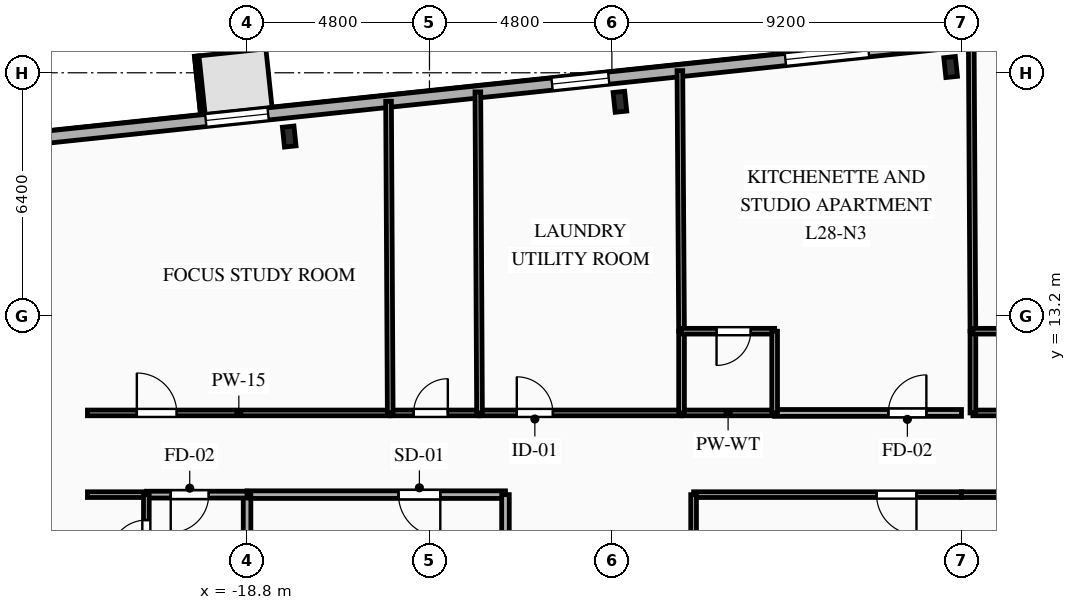
"""IFC4 building model, lengths in metres.
Left out: names, types, materials, properties, quantities, classifications, styles, units other than length and angle.
Written with IfcOpenShell. Run it as: python <this file> out.ifc"""

import sys

from ifc_helpers import new_model, si_unit, direction, frame, frame_2d, origin, origin_2d, place, context, subcontext, project, spatial, rectangle, i_section, extrude, element, fill, save


model = new_model("IFC4")
c1 = context("Model", 3, precision=1e-05, world=origin(), true_north=direction((0.0, 1.0)))
c2 = subcontext(c1, "Body", "Model", "MODEL_VIEW")
j1 = project(units=[si_unit("LENGTHUNIT", "METRE"), si_unit("PLANEANGLEUNIT", "RADIAN")], contexts=[c1])
p1 = place(None, origin())
s1 = spatial("IfcSite", under=j1, at=p1, CompositionType="ELEMENT")
p2 = place(p1, origin())
s2 = spatial("IfcBuilding", under=s1, at=p2, CompositionType="ELEMENT")
p3 = place(p2, frame((0.0, 0.0, 102.45)))
s3 = spatial("IfcBuildingStorey", under=s2, at=p3, CompositionType="ELEMENT", Elevation=102.45)
for number, where, z_axis, x_axis in (
    (1, (-0.287, 19.751, 0.0), (0.0, 0.0, 1.0), (0.995, 0.105, 0.0)),
    (2, (-8.989, 18.836, 0.0), (0.0, 0.0, 1.0), (0.995, 0.105, 0.0)),
    (3, (-17.691, 17.922, 0.0), (0.0, 0.0, 1.0), (0.995, 0.105, 0.0)),
):
    element("IfcColumn", number, at=place(p3, frame(where, z_axis=z_axis, x_axis=x_axis)), inside=s3, PredefinedType="COLUMN", context=c2, shape_type="SweptSolid", body=[
        extrude(i_section(OverallWidth=0.306, OverallDepth=0.524, WebThickness=0.021, FlangeThickness=0.04, FilletRadius=0.027, at=origin_2d()), origin(), (0.0, 0.0, 1.0), 3.35),
    ])
p4 = place(p3, frame((-27.107, 17.586, 0.0), z_axis=(0.0, 0.0, 1.0), x_axis=(0.994521628355, 0.104531003701, 0.0)))
e4 = element("IfcWall", 4, at=p4, inside=s3, PredefinedType="SOLIDWALL", context=c2, shape_type="SweptSolid", body=[
    extrude(rectangle(XDim=53.8, YDim=0.32, at=frame_2d((26.9, 0.0))), origin(), (0.0, 0.0, 1.0), 3.045),
])
p5 = place(p4, frame((7.261, 0.0, 0.85)))
e5 = element("IfcOpeningElement", 5, at=p5, cuts=e4, PredefinedType="OPENING", context=c2, shape_type="SweptSolid", body=[
    extrude(rectangle(XDim=1.65, YDim=1.85, at=frame_2d((0.825, 0.925))), frame((0.0, 0.17, 0.0), z_axis=(0.0, -1.0, 0.0), x_axis=(1.0, 0.0, 0.0)), (0.0, 0.0, 1.0), 0.34),
])
p6 = place(p4, frame((16.423, 0.0, 0.85)))
e6 = element("IfcOpeningElement", 6, at=p6, cuts=e4, PredefinedType="OPENING", context=c2, shape_type="SweptSolid", body=[
    extrude(rectangle(XDim=1.5, YDim=1.85, at=frame_2d((0.75, 0.925))), frame((0.0, 0.17, 0.0), z_axis=(0.0, -1.0, 0.0), x_axis=(1.0, 0.0, 0.0)), (0.0, 0.0, 1.0), 0.34),
])
p7 = place(p4, frame((22.598, 0.0, 0.85)))
e7 = element("IfcOpeningElement", 7, at=p7, cuts=e4, PredefinedType="OPENING", context=c2, shape_type="SweptSolid", body=[
    extrude(rectangle(XDim=2.2, YDim=1.85, at=frame_2d((1.1, 0.925))), frame((0.0, 0.17, 0.0), z_axis=(0.0, -1.0, 0.0), x_axis=(1.0, 0.0, 0.0)), (0.0, 0.0, 1.0), 0.34),
])
p8 = place(p4, frame((30.283, 0.0, 0.85)))
e8 = element("IfcOpeningElement", 8, at=p8, cuts=e4, PredefinedType="OPENING", context=c2, shape_type="SweptSolid", body=[
    extrude(rectangle(XDim=2.2, YDim=1.85, at=frame_2d((1.1, 0.925))), frame((0.0, 0.17, 0.0), z_axis=(0.0, -1.0, 0.0), x_axis=(1.0, 0.0, 0.0)), (0.0, 0.0, 1.0), 0.34),
])
p9 = place(p4, frame((38.009, 0.0, 0.85)))
e9 = element("IfcOpeningElement", 9, at=p9, cuts=e4, PredefinedType="OPENING", context=c2, shape_type="SweptSolid", body=[
    extrude(rectangle(XDim=2.2, YDim=1.85, at=frame_2d((1.1, 0.925))), frame((0.0, 0.17, 0.0), z_axis=(0.0, -1.0, 0.0), x_axis=(1.0, 0.0, 0.0)), (0.0, 0.0, 1.0), 0.34),
])
p10 = place(p4, frame((44.008, 0.0, 0.85)))
e10 = element("IfcOpeningElement", 10, at=p10, cuts=e4, PredefinedType="OPENING", context=c2, shape_type="SweptSolid", body=[
    extrude(rectangle(XDim=1.65, YDim=1.85, at=frame_2d((0.825, 0.925))), frame((0.0, 0.17, 0.0), z_axis=(0.0, -1.0, 0.0), x_axis=(1.0, 0.0, 0.0)), (0.0, 0.0, 1.0), 0.34),
])
p11 = place(p4, frame((47.691, 0.0, 0.85)))
e11 = element("IfcOpeningElement", 11, at=p11, cuts=e4, PredefinedType="OPENING", context=c2, shape_type="SweptSolid", body=[
    extrude(rectangle(XDim=1.65, YDim=1.85, at=frame_2d((0.825, 0.925))), frame((0.0, 0.17, 0.0), z_axis=(0.0, -1.0, 0.0), x_axis=(1.0, 0.0, 0.0)), (0.0, 0.0, 1.0), 0.34),
])
p12 = place(p4, frame((51.054, 0.0, 0.85)))
e12 = element("IfcOpeningElement", 12, at=p12, cuts=e4, PredefinedType="OPENING", context=c2, shape_type="SweptSolid", body=[
    extrude(rectangle(XDim=1.65, YDim=1.85, at=frame_2d((0.825, 0.925))), frame((0.0, 0.17, 0.0), z_axis=(0.0, -1.0, 0.0), x_axis=(1.0, 0.0, 0.0)), (0.0, 0.0, 1.0), 0.34),
])
p13 = place(p3, frame((-12.0, 8.5, 0.0), z_axis=(0.0, 0.0, 1.0), x_axis=(-1.0, 0.0, 0.0)))
e13 = element("IfcWall", 13, at=p13, inside=s3, PredefinedType="PARTITIONING", context=c2, shape_type="SweptSolid", body=[
    extrude(rectangle(XDim=6.8, YDim=0.2, at=frame_2d((3.4, 0.0))), origin(), (0.0, 0.0, 1.0), 3.045),
])
p14 = place(p13, frame((1.715, 0.0, 0.0)))
e14 = element("IfcOpeningElement", 14, at=p14, cuts=e13, PredefinedType="OPENING", context=c2, shape_type="SweptSolid", body=[
    extrude(rectangle(XDim=1.1, YDim=2.15, at=frame_2d((0.55, 1.075))), frame((0.0, 0.11, 0.0), z_axis=(0.0, -1.0, 0.0), x_axis=(1.0, 0.0, 0.0)), (0.0, 0.0, 1.0), 0.22),
])
p15 = place(p3, frame((-12.0, 5.6, 0.0), z_axis=(0.0, 0.0, 1.0), x_axis=(0.0, 1.0, 0.0)))
e15 = element("IfcWall", 15, at=p15, inside=s3, PredefinedType="PARTITIONING", context=c2, shape_type="SweptSolid", body=[
    extrude(rectangle(XDim=2.9, YDim=0.2, at=frame_2d((1.45, 0.0))), origin(), (0.0, 0.0, 1.0), 3.045),
])
p16 = place(p3, frame((-18.8, 8.5, 0.0), z_axis=(0.0, 0.0, 1.0), x_axis=(0.0, -1.0, 0.0)))
e16 = element("IfcWall", 16, at=p16, inside=s3, PredefinedType="PARTITIONING", context=c2, shape_type="SweptSolid", body=[
    extrude(rectangle(XDim=2.9, YDim=0.2, at=frame_2d((1.45, 0.0))), origin(), (0.0, 0.0, 1.0), 2.53),
])
p17 = place(p3, frame((-18.8, 8.5, 0.0), z_axis=(0.0, 0.0, 1.0), x_axis=(-1.0, 0.0, 0.0)))
e17 = element("IfcWall", 17, at=p17, inside=s3, PredefinedType="PARTITIONING", context=c2, shape_type="SweptSolid", body=[
    extrude(rectangle(XDim=2.65, YDim=0.18, at=frame_2d((1.325, 0.0))), origin(), (0.0, 0.0, 1.0), 3.045),
])
p18 = place(p17, frame((1.009, 0.0, 0.0)))
e18 = element("IfcOpeningElement", 18, at=p18, cuts=e17, PredefinedType="OPENING", context=c2, shape_type="SweptSolid", body=[
    extrude(rectangle(XDim=1.0, YDim=2.15, at=frame_2d((0.5, 1.075))), frame((0.0, 0.1, 0.0), z_axis=(0.0, -1.0, 0.0), x_axis=(1.0, 0.0, 0.0)), (0.0, 0.0, 1.0), 0.2),
])
p19 = place(p3, frame((-21.45, 8.5, 0.0), z_axis=(0.0, 0.0, 1.0), x_axis=(-1.0, 0.0, 0.0)))
e19 = element("IfcWall", 19, at=p19, inside=s3, PredefinedType="PARTITIONING", context=c2, shape_type="SweptSolid", body=[
    extrude(rectangle(XDim=1.55, YDim=0.15, at=frame_2d((0.775, 0.0))), origin(), (0.0, 0.0, 1.0), 3.045),
])
p20 = place(p3, frame((-23.0, 10.65, 0.0), z_axis=(0.0, 0.0, 1.0), x_axis=(1.0, 0.0, 0.0)))
e20 = element("IfcWall", 20, at=p20, inside=s3, PredefinedType="PARTITIONING", context=c2, shape_type="SweptSolid", body=[
    extrude(rectangle(XDim=7.967, YDim=0.15, at=frame_2d((3.983, 0.0))), origin(), (0.0, 0.0, 1.0), 3.045),
])
p21 = place(p20, frame((1.3, 0.0, 0.0)))
e21 = element("IfcOpeningElement", 21, at=p21, cuts=e20, PredefinedType="OPENING", context=c2, shape_type="SweptSolid", body=[
    extrude(rectangle(XDim=1.05, YDim=2.15, at=frame_2d((0.525, 1.075))), frame((0.0, 0.085, 0.0), z_axis=(0.0, -1.0, 0.0), x_axis=(1.0, 0.0, 0.0)), (0.0, 0.0, 1.0), 0.17),
])
p22 = place(p3, frame((-15.033, 10.65, 0.0), z_axis=(0.0, 0.0, 1.0), x_axis=(1.0, 0.0, 0.0)))
e22 = element("IfcWall", 22, at=p22, inside=s3, PredefinedType="PLUMBINGWALL", context=c2, shape_type="SweptSolid", body=[
    extrude(rectangle(XDim=2.35, YDim=0.15, at=frame_2d((1.175, 0.0))), origin(), (0.0, 0.0, 1.0), 3.045),
])
p23 = place(p22, frame((0.616, 0.0, 0.0)))
e23 = element("IfcOpeningElement", 23, at=p23, cuts=e22, PredefinedType="OPENING", context=c2, shape_type="SweptSolid", body=[
    extrude(rectangle(XDim=0.9, YDim=2.1, at=frame_2d((0.45, 1.05))), frame((0.0, 0.085, 0.0), z_axis=(0.0, -1.0, 0.0), x_axis=(1.0, 0.0, 0.0)), (0.0, 0.0, 1.0), 0.17),
])
p24 = place(p3, frame((-12.683, 10.65, 0.0), z_axis=(0.0, 0.0, 1.0), x_axis=(1.0, 0.0, 0.0)))
e24 = element("IfcWall", 24, at=p24, inside=s3, PredefinedType="PARTITIONING", context=c2, shape_type="SweptSolid", body=[
    extrude(rectangle(XDim=5.316, YDim=0.15, at=frame_2d((2.658, 0.0))), origin(), (0.0, 0.0, 1.0), 3.045),
])
p25 = place(p24, frame((0.981, 0.0, 0.0)))
e25 = element("IfcOpeningElement", 25, at=p25, cuts=e24, PredefinedType="OPENING", context=c2, shape_type="SweptSolid", body=[
    extrude(rectangle(XDim=0.95, YDim=2.1, at=frame_2d((0.475, 1.05))), frame((0.0, 0.085, 0.0), z_axis=(0.0, -1.0, 0.0), x_axis=(1.0, 0.0, 0.0)), (0.0, 0.0, 1.0), 0.17),
])
p26 = place(p3, frame((-4.917, 10.65, 0.0), z_axis=(0.0, 0.0, 1.0), x_axis=(1.0, 0.0, 0.0)))
e26 = element("IfcWall", 26, at=p26, inside=s3, PredefinedType="PARTITIONING", context=c2, shape_type="SweptSolid", body=[
    extrude(rectangle(XDim=4.917, YDim=0.18, at=frame_2d((2.458, 0.0))), origin(), (0.0, 0.0, 1.0), 3.045),
])
p27 = place(p26, frame((2.992, 0.0, 0.0)))
e27 = element("IfcOpeningElement", 27, at=p27, cuts=e26, PredefinedType="OPENING", context=c2, shape_type="SweptSolid", body=[
    extrude(rectangle(XDim=1.0, YDim=2.15, at=frame_2d((0.5, 1.075))), frame((0.0, 0.1, 0.0), z_axis=(0.0, -1.0, 0.0), x_axis=(1.0, 0.0, 0.0)), (0.0, 0.0, 1.0), 0.2),
])
p28 = place(p3, frame((-7.367, 10.65, 0.0), z_axis=(0.0, 0.0, 1.0), x_axis=(1.0, 0.0, 0.0)))
e28 = element("IfcWall", 28, at=p28, inside=s3, PredefinedType="PLUMBINGWALL", context=c2, shape_type="SweptSolid", body=[
    extrude(rectangle(XDim=2.45, YDim=0.15, at=frame_2d((1.225, 0.0))), origin(), (0.0, 0.0, 1.0), 3.045),
])
p29 = place(p3, frame((0.0, 8.5, 0.0), z_axis=(0.0, 0.0, 1.0), x_axis=(-1.0, 0.0, 0.0)))
e29 = element("IfcWall", 29, at=p29, inside=s3, PredefinedType="PARTITIONING", context=c2, shape_type="SweptSolid", body=[
    extrude(rectangle(XDim=7.05, YDim=0.15, at=frame_2d((3.525, 0.0))), origin(), (0.0, 0.0, 1.0), 3.045),
])
p30 = place(p29, frame((1.185, 0.0, 0.0)))
e30 = element("IfcOpeningElement", 30, at=p30, cuts=e29, PredefinedType="OPENING", context=c2, shape_type="SweptSolid", body=[
    extrude(rectangle(XDim=1.05, YDim=2.15, at=frame_2d((0.525, 1.075))), frame((0.0, 0.085, 0.0), z_axis=(0.0, -1.0, 0.0), x_axis=(1.0, 0.0, 0.0)), (0.0, 0.0, 1.0), 0.17),
])
p31 = place(p3, frame((0.3, 10.65, 0.0), z_axis=(0.0, 0.0, 1.0), x_axis=(1.0, 0.0, 0.0)))
e31 = element("IfcWall", 31, at=p31, inside=s3, PredefinedType="PLUMBINGWALL", context=c2, shape_type="SweptSolid", body=[
    extrude(rectangle(XDim=2.45, YDim=0.15, at=frame_2d((1.225, 0.0))), origin(), (0.0, 0.0, 1.0), 3.045),
])
for number, where, z_axis, x_axis in (
    (32, (7.05, 8.5, 0.0), (0.0, 0.0, 1.0), (-1.0, 0.0, 0.0)),
    (33, (-7.05, 8.5, 0.0), (0.0, 0.0, 1.0), (0.0, -1.0, 0.0)),
):
    element("IfcWall", number, at=place(p3, frame(where, z_axis=z_axis, x_axis=x_axis)), inside=s3, PredefinedType="PARTITIONING", context=c2, shape_type="SweptSolid", body=[
        extrude(rectangle(XDim=7.05, YDim=0.15, at=frame_2d((3.525, 0.0))), origin(), (0.0, 0.0, 1.0), 3.045),
    ])
p32 = place(p3, frame((-21.45, 5.68, 0.0), z_axis=(0.0, 0.0, 1.0), x_axis=(0.0, 1.0, 0.0)))
e34 = element("IfcWall", 34, at=p32, inside=s3, PredefinedType="PARTITIONING", context=c2, shape_type="SweptSolid", body=[
    extrude(rectangle(XDim=2.82, YDim=0.15, at=frame_2d((1.41, 0.0))), origin(), (0.0, 0.0, 1.0), 3.045),
])
p33 = place(p32, frame((1.201, 0.0, 0.0)))
e35 = element("IfcOpeningElement", 35, at=p33, cuts=e34, PredefinedType="OPENING", context=c2, shape_type="SweptSolid", body=[
    extrude(rectangle(XDim=0.95, YDim=2.1, at=frame_2d((0.475, 1.05))), frame((0.0, 0.085, 0.0), z_axis=(0.0, -1.0, 0.0), x_axis=(1.0, 0.0, 0.0)), (0.0, 0.0, 1.0), 0.17),
])
p34 = place(p3, frame((-15.077, 18.85, 0.0), z_axis=(0.0, 0.0, 1.0), x_axis=(0.005358979853, -0.999985640564, 0.0)))
e36 = element("IfcWall", 36, at=p34, inside=s3, PredefinedType="PLUMBINGWALL", context=c2, shape_type="SweptSolid", body=[
    extrude(rectangle(XDim=8.2, YDim=0.15, at=frame_2d((4.1, 0.0))), origin(), (0.0, 0.0, 1.0), 3.045),
])
p35 = place(p3, frame((-12.727, 19.097, 0.0), z_axis=(0.0, 0.0, 1.0), x_axis=(0.005173341175, -0.999986618181, 0.0)))
e37 = element("IfcWall", 37, at=p35, inside=s3, PredefinedType="PLUMBINGWALL", context=c2, shape_type="SweptSolid", body=[
    extrude(rectangle(XDim=8.447, YDim=0.15, at=frame_2d((4.224, 0.0))), origin(), (0.0, 0.0, 1.0), 3.045),
])
p36 = place(p3, frame((-7.411, 19.656, 0.0), z_axis=(0.0, 0.0, 1.0), x_axis=(0.006409668201, -0.999979457866, 0.0)))
e38 = element("IfcWall", 38, at=p36, inside=s3, PredefinedType="PARTITIONING", context=c2, shape_type="SweptSolid", body=[
    extrude(rectangle(XDim=6.856, YDim=0.15, at=frame_2d((3.428, 0.0))), origin(), (0.0, 0.0, 1.0), 3.045),
])
p37 = place(p3, frame((-7.367, 12.8, 0.0), z_axis=(0.0, 0.0, 1.0), x_axis=(0.0, -1.0, 0.0)))
e39 = element("IfcWall", 39, at=p37, inside=s3, PredefinedType="PLUMBINGWALL", context=c2, shape_type="SweptSolid", body=[
    extrude(rectangle(XDim=2.15, YDim=0.15, at=frame_2d((1.075, 0.0))), origin(), (0.0, 0.0, 1.0), 3.045),
])
p38 = place(p3, frame((-4.917, 12.8, 0.0), z_axis=(0.0, 0.0, 1.0), x_axis=(-1.0, 0.0, 0.0)))
e40 = element("IfcWall", 40, at=p38, inside=s3, PredefinedType="PLUMBINGWALL", context=c2, shape_type="SweptSolid", body=[
    extrude(rectangle(XDim=2.45, YDim=0.15, at=frame_2d((1.225, 0.0))), origin(), (0.0, 0.0, 1.0), 3.045),
])
p39 = place(p38, frame((0.629, 0.0, 0.0)))
e41 = element("IfcOpeningElement", 41, at=p39, cuts=e40, PredefinedType="OPENING", context=c2, shape_type="SweptSolid", body=[
    extrude(rectangle(XDim=0.9, YDim=2.1, at=frame_2d((0.45, 1.05))), frame((0.0, 0.085, 0.0), z_axis=(0.0, -1.0, 0.0), x_axis=(1.0, 0.0, 0.0)), (0.0, 0.0, 1.0), 0.17),
])
p40 = place(p3, frame((-4.917, 10.65, 0.0), z_axis=(0.0, 0.0, 1.0), x_axis=(0.0, 1.0, 0.0)))
e42 = element("IfcWall", 42, at=p40, inside=s3, PredefinedType="PLUMBINGWALL", context=c2, shape_type="SweptSolid", body=[
    extrude(rectangle(XDim=2.15, YDim=0.15, at=frame_2d((1.075, 0.0))), origin(), (0.0, 0.0, 1.0), 3.045),
])
p41 = place(p3, frame((0.256, 20.462, 0.0), z_axis=(0.0, 0.0, 1.0), x_axis=(0.00573567775, -0.999983550865, 0.0)))
e43 = element("IfcWall", 43, at=p41, inside=s3, PredefinedType="PARTITIONING", context=c2, shape_type="SweptSolid", body=[
    extrude(rectangle(XDim=7.662, YDim=0.15, at=frame_2d((3.831, 0.0))), origin(), (0.0, 0.0, 1.0), 3.045),
])
p42 = place(p3, frame((0.3, 12.8, 0.0), z_axis=(0.0, 0.0, 1.0), x_axis=(0.0, -1.0, 0.0)))
e44 = element("IfcWall", 44, at=p42, inside=s3, PredefinedType="PLUMBINGWALL", context=c2, shape_type="SweptSolid", body=[
    extrude(rectangle(XDim=2.15, YDim=0.15, at=frame_2d((1.075, 0.0))), origin(), (0.0, 0.0, 1.0), 3.045),
])
p43 = place(p3, frame((2.75, 12.8, 0.0), z_axis=(0.0, 0.0, 1.0), x_axis=(-1.0, 0.0, 0.0)))
e45 = element("IfcWall", 45, at=p43, inside=s3, PredefinedType="PLUMBINGWALL", context=c2, shape_type="SweptSolid", body=[
    extrude(rectangle(XDim=2.45, YDim=0.15, at=frame_2d((1.225, 0.0))), origin(), (0.0, 0.0, 1.0), 3.045),
])
p44 = place(p43, frame((0.629, 0.0, 0.0)))
e46 = element("IfcOpeningElement", 46, at=p44, cuts=e45, PredefinedType="OPENING", context=c2, shape_type="SweptSolid", body=[
    extrude(rectangle(XDim=0.9, YDim=2.1, at=frame_2d((0.45, 1.05))), frame((0.0, 0.085, 0.0), z_axis=(0.0, -1.0, 0.0), x_axis=(1.0, 0.0, 0.0)), (0.0, 0.0, 1.0), 0.17),
])
p45 = place(p5, origin())
e47 = element("IfcWindow", 47, at=p45, inside=s3, PartitioningType="SINGLE_PANEL", PredefinedType="WINDOW", context=c2, shape_type="SweptSolid", body=[
    extrude(rectangle(XDim=1.65, YDim=1.85, at=frame_2d((0.825, 0.925))), frame((0.0, 0.03, 0.0), z_axis=(0.0, -1.0, 0.0), x_axis=(1.0, 0.0, 0.0)), (0.0, 0.0, 1.0), 0.06),
])
fill(e5, e47)
p46 = place(p6, origin())
e48 = element("IfcWindow", 48, at=p46, inside=s3, PartitioningType="SINGLE_PANEL", PredefinedType="WINDOW", context=c2, shape_type="SweptSolid", body=[
    extrude(rectangle(XDim=1.5, YDim=1.85, at=frame_2d((0.75, 0.925))), frame((0.0, 0.03, 0.0), z_axis=(0.0, -1.0, 0.0), x_axis=(1.0, 0.0, 0.0)), (0.0, 0.0, 1.0), 0.06),
])
fill(e6, e48)
p47 = place(p7, origin())
e49 = element("IfcWindow", 49, at=p47, inside=s3, PartitioningType="SINGLE_PANEL", PredefinedType="WINDOW", context=c2, shape_type="SweptSolid", body=[
    extrude(rectangle(XDim=2.2, YDim=1.85, at=frame_2d((1.1, 0.925))), frame((0.0, 0.03, 0.0), z_axis=(0.0, -1.0, 0.0), x_axis=(1.0, 0.0, 0.0)), (0.0, 0.0, 1.0), 0.06),
])
fill(e7, e49)
p48 = place(p14, origin())
e50 = element("IfcDoor", 50, at=p48, inside=s3, OperationType="SINGLE_SWING_LEFT", PredefinedType="DOOR", context=c2, shape_type="SweptSolid", body=[
    extrude(rectangle(XDim=1.1, YDim=2.15, at=frame_2d((0.55, 1.075))), frame((0.0, 0.025, 0.0), z_axis=(0.0, -1.0, 0.0), x_axis=(1.0, 0.0, 0.0)), (0.0, 0.0, 1.0), 0.05),
])
fill(e14, e50)
p49 = place(p18, origin())
e51 = element("IfcDoor", 51, at=p49, inside=s3, OperationType="SINGLE_SWING_RIGHT", PredefinedType="DOOR", context=c2, shape_type="SweptSolid", body=[
    extrude(rectangle(XDim=1.0, YDim=2.15, at=frame_2d((0.5, 1.075))), frame((0.0, 0.025, 0.0), z_axis=(0.0, -1.0, 0.0), x_axis=(1.0, 0.0, 0.0)), (0.0, 0.0, 1.0), 0.05),
])
fill(e18, e51)
p50 = place(p21, origin())
e52 = element("IfcDoor", 52, at=p50, inside=s3, OperationType="SINGLE_SWING_LEFT", PredefinedType="DOOR", context=c2, shape_type="SweptSolid", body=[
    extrude(rectangle(XDim=1.05, YDim=2.15, at=frame_2d((0.525, 1.075))), frame((0.0, 0.025, 0.0), z_axis=(0.0, -1.0, 0.0), x_axis=(1.0, 0.0, 0.0)), (0.0, 0.0, 1.0), 0.05),
])
fill(e21, e52)
p51 = place(p23, origin())
e53 = element("IfcDoor", 53, at=p51, inside=s3, OperationType="SINGLE_SWING_RIGHT", PredefinedType="DOOR", context=c2, shape_type="SweptSolid", body=[
    extrude(rectangle(XDim=0.9, YDim=2.1, at=frame_2d((0.45, 1.05))), frame((0.0, 0.025, 0.0), z_axis=(0.0, -1.0, 0.0), x_axis=(1.0, 0.0, 0.0)), (0.0, 0.0, 1.0), 0.05),
])
fill(e23, e53)
p52 = place(p25, origin())
e54 = element("IfcDoor", 54, at=p52, inside=s3, OperationType="SINGLE_SWING_LEFT", PredefinedType="DOOR", context=c2, shape_type="SweptSolid", body=[
    extrude(rectangle(XDim=0.95, YDim=2.1, at=frame_2d((0.475, 1.05))), frame((0.0, 0.025, 0.0), z_axis=(0.0, -1.0, 0.0), x_axis=(1.0, 0.0, 0.0)), (0.0, 0.0, 1.0), 0.05),
])
fill(e25, e54)
p53 = place(p27, origin())
e55 = element("IfcDoor", 55, at=p53, inside=s3, OperationType="SINGLE_SWING_RIGHT", PredefinedType="DOOR", context=c2, shape_type="SweptSolid", body=[
    extrude(rectangle(XDim=1.0, YDim=2.15, at=frame_2d((0.5, 1.075))), frame((0.0, 0.025, 0.0), z_axis=(0.0, -1.0, 0.0), x_axis=(1.0, 0.0, 0.0)), (0.0, 0.0, 1.0), 0.05),
])
fill(e27, e55)
p54 = place(p30, origin())
e56 = element("IfcDoor", 56, at=p54, inside=s3, OperationType="SINGLE_SWING_LEFT", PredefinedType="DOOR", context=c2, shape_type="SweptSolid", body=[
    extrude(rectangle(XDim=1.05, YDim=2.15, at=frame_2d((0.525, 1.075))), frame((0.0, 0.025, 0.0), z_axis=(0.0, -1.0, 0.0), x_axis=(1.0, 0.0, 0.0)), (0.0, 0.0, 1.0), 0.05),
])
fill(e30, e56)
p55 = place(p33, origin())
e57 = element("IfcDoor", 57, at=p55, inside=s3, OperationType="SINGLE_SWING_LEFT", PredefinedType="DOOR", context=c2, shape_type="SweptSolid", body=[
    extrude(rectangle(XDim=0.95, YDim=2.1, at=frame_2d((0.475, 1.05))), frame((0.0, 0.025, 0.0), z_axis=(0.0, -1.0, 0.0), x_axis=(1.0, 0.0, 0.0)), (0.0, 0.0, 1.0), 0.05),
])
fill(e35, e57)
p56 = place(p39, origin())
e58 = element("IfcDoor", 58, at=p56, inside=s3, OperationType="SINGLE_SWING_RIGHT", PredefinedType="DOOR", context=c2, shape_type="SweptSolid", body=[
    extrude(rectangle(XDim=0.9, YDim=2.1, at=frame_2d((0.45, 1.05))), frame((0.0, 0.025, 0.0), z_axis=(0.0, -1.0, 0.0), x_axis=(1.0, 0.0, 0.0)), (0.0, 0.0, 1.0), 0.05),
])
fill(e41, e58)
save(model, sys.argv[1])
